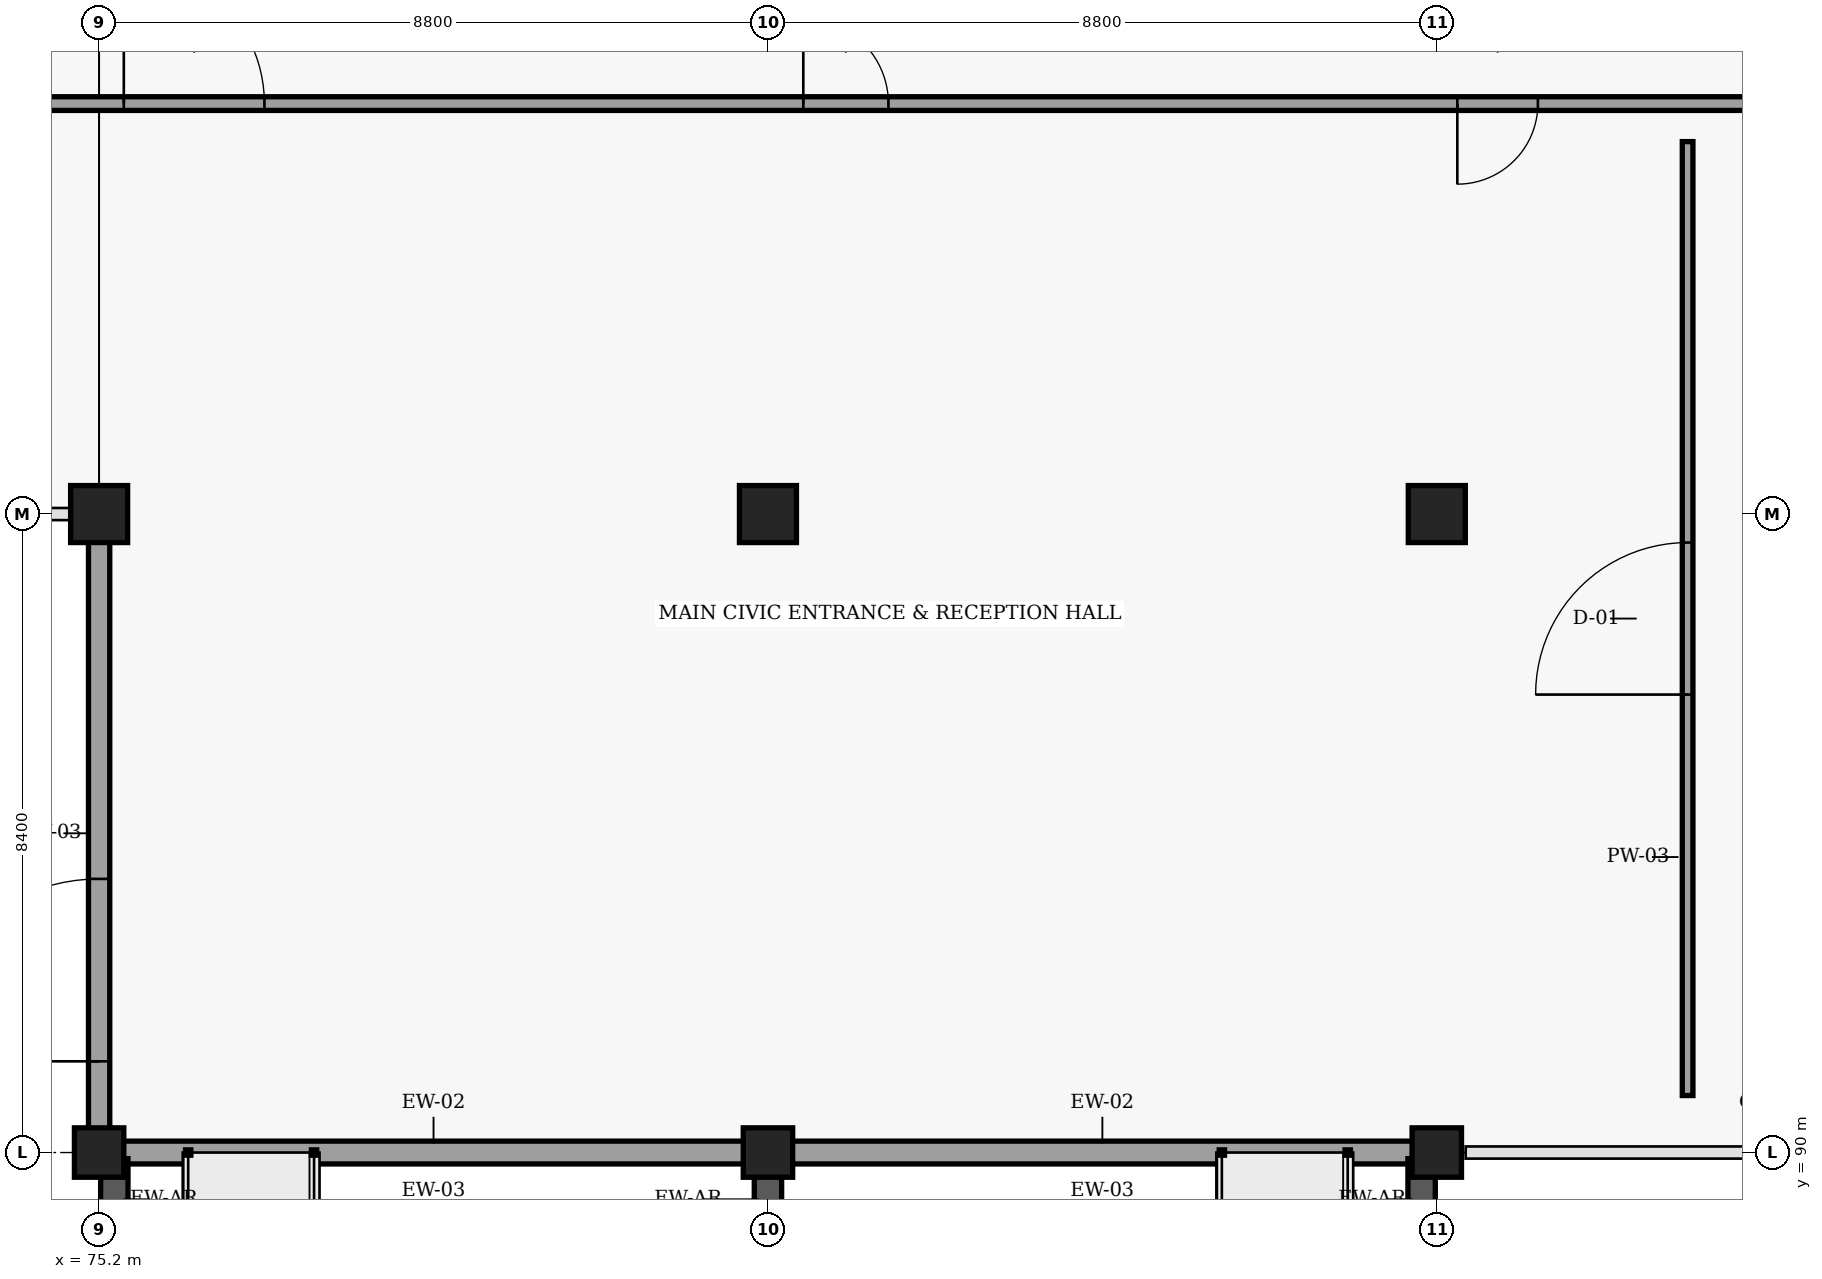
"""IFC4 building model, lengths in metres.
Left out: names, types, materials, properties, quantities, classifications, styles, units other than length and angle.
Written with IfcOpenShell. Run it as: python <this file> out.ifc"""

import sys

from ifc_helpers import new_model, si_unit, direction, frame, frame_2d, origin, origin_2d, place, context, subcontext, project, spatial, rectangle, extrude, element, fill, save


model = new_model("IFC4")
c1 = context("Model", 3, precision=1e-05, world=origin(), true_north=direction((0.0, 1.0)))
c2 = subcontext(c1, "Body", "Model", "MODEL_VIEW")
j1 = project(units=[si_unit("LENGTHUNIT", "METRE"), si_unit("PLANEANGLEUNIT", "RADIAN")], contexts=[c1])
p1 = place(None, origin())
s1 = spatial("IfcSite", under=j1, at=p1, CompositionType="ELEMENT")
p2 = place(p1, origin())
s2 = spatial("IfcBuilding", under=s1, at=p2, CompositionType="ELEMENT")
p3 = place(p2, origin())
s3 = spatial("IfcBuildingStorey", under=s2, at=p3, CompositionType="ELEMENT", Elevation=0.0)
p4 = place(p3, frame((75.2, 90.0, 0.0), z_axis=(0.0, 0.0, 1.0), x_axis=(1.0, 0.0, 0.0)))
e1 = element("IfcColumn", 1, at=p4, inside=s3, PredefinedType="COLUMN", context=c2, shape_type="SweptSolid", body=[
    extrude(rectangle(XDim=0.65, YDim=0.65, at=origin_2d()), origin(), (0.0, 0.0, 1.0), 4.8),
])
p5 = place(p3, frame((75.2, 98.4, 0.0), z_axis=(0.0, 0.0, 1.0), x_axis=(1.0, 0.0, 0.0)))
e2 = element("IfcColumn", 2, at=p5, inside=s3, PredefinedType="COLUMN", context=c2, shape_type="SweptSolid", body=[
    extrude(rectangle(XDim=0.75, YDim=0.75, at=origin_2d()), origin(), (0.0, 0.0, 1.0), 4.8),
])
p6 = place(p3, frame((84.0, 90.0, 0.0), z_axis=(0.0, 0.0, 1.0), x_axis=(1.0, 0.0, 0.0)))
e3 = element("IfcColumn", 3, at=p6, inside=s3, PredefinedType="COLUMN", context=c2, shape_type="SweptSolid", body=[
    extrude(rectangle(XDim=0.65, YDim=0.65, at=origin_2d()), origin(), (0.0, 0.0, 1.0), 4.8),
])
p7 = place(p3, frame((84.0, 98.4, 0.0), z_axis=(0.0, 0.0, 1.0), x_axis=(1.0, 0.0, 0.0)))
e4 = element("IfcColumn", 4, at=p7, inside=s3, PredefinedType="COLUMN", context=c2, shape_type="SweptSolid", body=[
    extrude(rectangle(XDim=0.75, YDim=0.75, at=origin_2d()), origin(), (0.0, 0.0, 1.0), 4.8),
])
p8 = place(p3, frame((92.8, 90.0, 0.0), z_axis=(0.0, 0.0, 1.0), x_axis=(1.0, 0.0, 0.0)))
e5 = element("IfcColumn", 5, at=p8, inside=s3, PredefinedType="COLUMN", context=c2, shape_type="SweptSolid", body=[
    extrude(rectangle(XDim=0.65, YDim=0.65, at=origin_2d()), origin(), (0.0, 0.0, 1.0), 4.8),
])
p9 = place(p3, frame((92.8, 98.4, 0.0), z_axis=(0.0, 0.0, 1.0), x_axis=(1.0, 0.0, 0.0)))
e6 = element("IfcColumn", 6, at=p9, inside=s3, PredefinedType="COLUMN", context=c2, shape_type="SweptSolid", body=[
    extrude(rectangle(XDim=0.75, YDim=0.75, at=origin_2d()), origin(), (0.0, 0.0, 1.0), 4.8),
])
for number, where, z_axis, x_axis in (
    (7, (75.3, 90.0, 0.0), (0.0, 0.0, 1.0), (1.0, 0.0, 0.0)),
    (8, (84.1, 90.0, 0.0), (0.0, 0.0, 1.0), (1.0, 0.0, 0.0)),
):
    element("IfcWall", number, at=place(p3, frame(where, z_axis=z_axis, x_axis=x_axis)), inside=s3, PredefinedType="SOLIDWALL", context=c2, shape_type="SweptSolid", body=[
        extrude(rectangle(XDim=8.6, YDim=0.3, at=frame_2d((4.3, 0.0))), origin(), (0.0, 0.0, 1.0), 3.675),
    ])
p10 = place(p3, frame((75.2, 90.15, 0.0), z_axis=(0.0, 0.0, 1.0), x_axis=(0.0, 1.0, 0.0)))
e9 = element("IfcWall", 9, at=p10, inside=s3, PredefinedType="SOLIDWALL", context=c2, shape_type="SweptSolid", body=[
    extrude(rectangle(XDim=8.1, YDim=0.28, at=frame_2d((4.05, 0.0))), origin(), (0.0, 0.0, 1.0), 3.775),
])
p11 = place(p10, frame((1.05, 0.0, 0.0)))
e10 = element("IfcOpeningElement", 10, at=p11, cuts=e9, PredefinedType="OPENING", context=c2, shape_type="SweptSolid", body=[
    extrude(rectangle(XDim=2.4, YDim=2.4, at=frame_2d((1.2, 1.2))), frame((0.0, 0.15, 0.0), z_axis=(0.0, -1.0, 0.0), x_axis=(1.0, 0.0, 0.0)), (0.0, 0.0, 1.0), 0.3),
])
for number, where, z_axis, x_axis in (
    (11, (75.4, 88.85, 0.0), (0.0, 0.0, 1.0), (0.0, 1.0, 0.0)),
    (12, (84.0, 88.85, 0.0), (0.0, 0.0, 1.0), (0.0, 1.0, 0.0)),
    (13, (92.6, 88.85, 0.0), (0.0, 0.0, 1.0), (0.0, 1.0, 0.0)),
):
    element("IfcWall", number, at=place(p3, frame(where, z_axis=z_axis, x_axis=x_axis)), inside=s3, PredefinedType="SOLIDWALL", context=c2, shape_type="SweptSolid", body=[
        extrude(rectangle(XDim=1.07, YDim=0.36, at=frame_2d((0.535, 0.0))), origin(), (0.0, 0.0, 1.0), 4.3),
    ])
p12 = place(p3, frame((42.15, 103.8, 0.0), z_axis=(0.0, 0.0, 1.0), x_axis=(1.0, 0.0, 0.0)))
e14 = element("IfcWall", 14, at=p12, inside=s3, PredefinedType="PARTITIONING", context=c2, shape_type="SweptSolid", body=[
    extrude(rectangle(XDim=102.9, YDim=0.18, at=frame_2d((51.45, 0.0))), origin(), (0.0, 0.0, 1.0), 3.775),
])
p13 = place(p12, frame((7.735, 0.0, 0.0)))
e15 = element("IfcOpeningElement", 15, at=p13, cuts=e14, PredefinedType="OPENING", context=c2, shape_type="SweptSolid", body=[
    extrude(rectangle(XDim=1.68, YDim=2.26, at=frame_2d((0.84, 1.13))), frame((0.0, 0.1, 0.0), z_axis=(0.0, -1.0, 0.0), x_axis=(1.0, 0.0, 0.0)), (0.0, 0.0, 1.0), 0.2),
])
p14 = place(p12, frame((16.63, 0.0, 0.0)))
e16 = element("IfcOpeningElement", 16, at=p14, cuts=e14, PredefinedType="OPENING", context=c2, shape_type="SweptSolid", body=[
    extrude(rectangle(XDim=1.04, YDim=2.08, at=frame_2d((0.52, 1.04))), frame((0.0, 0.1, 0.0), z_axis=(0.0, -1.0, 0.0), x_axis=(1.0, 0.0, 0.0)), (0.0, 0.0, 1.0), 0.2),
])
p15 = place(p12, frame((24.725, 0.0, 0.0)))
e17 = element("IfcOpeningElement", 17, at=p15, cuts=e14, PredefinedType="OPENING", context=c2, shape_type="SweptSolid", body=[
    extrude(rectangle(XDim=2.0, YDim=2.3, at=frame_2d((1.0, 1.15))), frame((0.0, 0.1, 0.0), z_axis=(0.0, -1.0, 0.0), x_axis=(1.0, 0.0, 0.0)), (0.0, 0.0, 1.0), 0.2),
])
p16 = place(p12, frame((33.375, 0.0, 0.0)))
e18 = element("IfcOpeningElement", 18, at=p16, cuts=e14, PredefinedType="OPENING", context=c2, shape_type="SweptSolid", body=[
    extrude(rectangle(XDim=1.85, YDim=2.22, at=frame_2d((0.925, 1.11))), frame((0.0, 0.1, 0.0), z_axis=(0.0, -1.0, 0.0), x_axis=(1.0, 0.0, 0.0)), (0.0, 0.0, 1.0), 0.2),
])
p17 = place(p12, frame((42.315, 0.0, 0.0)))
e19 = element("IfcOpeningElement", 19, at=p17, cuts=e14, PredefinedType="OPENING", context=c2, shape_type="SweptSolid", body=[
    extrude(rectangle(XDim=1.12, YDim=2.16, at=frame_2d((0.56, 1.08))), frame((0.0, 0.1, 0.0), z_axis=(0.0, -1.0, 0.0), x_axis=(1.0, 0.0, 0.0)), (0.0, 0.0, 1.0), 0.2),
])
p18 = place(p12, frame((50.92, 0.0, 0.0)))
e20 = element("IfcOpeningElement", 20, at=p18, cuts=e14, PredefinedType="OPENING", context=c2, shape_type="SweptSolid", body=[
    extrude(rectangle(XDim=1.06, YDim=2.16, at=frame_2d((0.53, 1.08))), frame((0.0, 0.1, 0.0), z_axis=(0.0, -1.0, 0.0), x_axis=(1.0, 0.0, 0.0)), (0.0, 0.0, 1.0), 0.2),
])
p19 = place(p12, frame((59.525, 0.0, 0.0)))
e21 = element("IfcOpeningElement", 21, at=p19, cuts=e14, PredefinedType="OPENING", context=c2, shape_type="SweptSolid", body=[
    extrude(rectangle(XDim=1.0, YDim=2.14, at=frame_2d((0.5, 1.07))), frame((0.0, 0.1, 0.0), z_axis=(0.0, -1.0, 0.0), x_axis=(1.0, 0.0, 0.0)), (0.0, 0.0, 1.0), 0.2),
])
p20 = place(p12, frame((68.11, 0.0, 0.0)))
e22 = element("IfcOpeningElement", 22, at=p20, cuts=e14, PredefinedType="OPENING", context=c2, shape_type="SweptSolid", body=[
    extrude(rectangle(XDim=0.98, YDim=2.12, at=frame_2d((0.49, 1.06))), frame((0.0, 0.1, 0.0), z_axis=(0.0, -1.0, 0.0), x_axis=(1.0, 0.0, 0.0)), (0.0, 0.0, 1.0), 0.2),
])
p21 = place(p12, frame((76.7, 0.0, 0.0)))
e23 = element("IfcOpeningElement", 23, at=p21, cuts=e14, PredefinedType="OPENING", context=c2, shape_type="SweptSolid", body=[
    extrude(rectangle(XDim=0.95, YDim=2.12, at=frame_2d((0.475, 1.06))), frame((0.0, 0.1, 0.0), z_axis=(0.0, -1.0, 0.0), x_axis=(1.0, 0.0, 0.0)), (0.0, 0.0, 1.0), 0.2),
])
p22 = place(p12, frame((85.29, 0.0, 0.0)))
e24 = element("IfcOpeningElement", 24, at=p22, cuts=e14, PredefinedType="OPENING", context=c2, shape_type="SweptSolid", body=[
    extrude(rectangle(XDim=0.92, YDim=2.1, at=frame_2d((0.46, 1.05))), frame((0.0, 0.1, 0.0), z_axis=(0.0, -1.0, 0.0), x_axis=(1.0, 0.0, 0.0)), (0.0, 0.0, 1.0), 0.2),
])
p23 = place(p12, frame((93.845, 0.0, 0.0)))
e25 = element("IfcOpeningElement", 25, at=p23, cuts=e14, PredefinedType="OPENING", context=c2, shape_type="SweptSolid", body=[
    extrude(rectangle(XDim=0.96, YDim=2.08, at=frame_2d((0.48, 1.04))), frame((0.0, 0.1, 0.0), z_axis=(0.0, -1.0, 0.0), x_axis=(1.0, 0.0, 0.0)), (0.0, 0.0, 1.0), 0.2),
])
p24 = place(p3, frame((96.1, 90.75, 0.0), z_axis=(0.0, 0.0, 1.0), x_axis=(0.0, 1.0, 0.0)))
e26 = element("IfcWall", 26, at=p24, inside=s3, PredefinedType="PARTITIONING", context=c2, shape_type="SweptSolid", body=[
    extrude(rectangle(XDim=12.55, YDim=0.14, at=frame_2d((6.275, 0.0))), origin(), (0.0, 0.0, 1.0), 3.675),
])
p25 = place(p24, frame((5.275, 0.0, 0.0)))
e27 = element("IfcOpeningElement", 27, at=p25, cuts=e26, PredefinedType="OPENING", context=c2, shape_type="SweptSolid", body=[
    extrude(rectangle(XDim=2.0, YDim=2.3, at=frame_2d((1.0, 1.15))), frame((0.0, 0.08, 0.0), z_axis=(0.0, -1.0, 0.0), x_axis=(1.0, 0.0, 0.0)), (0.0, 0.0, 1.0), 0.16),
])
p26 = place(p11, origin())
e28 = element("IfcDoor", 28, at=p26, inside=s3, OperationType="DOUBLE_DOOR_SINGLE_SWING", PredefinedType="DOOR", context=c2, shape_type="SweptSolid", body=[
    extrude(rectangle(XDim=2.4, YDim=2.4, at=frame_2d((1.2, 1.2))), frame((0.0, 0.025, 0.0), z_axis=(0.0, -1.0, 0.0), x_axis=(1.0, 0.0, 0.0)), (0.0, 0.0, 1.0), 0.05),
])
fill(e10, e28)
p27 = place(p16, origin())
e29 = element("IfcDoor", 29, at=p27, inside=s3, OperationType="DOUBLE_DOOR_SINGLE_SWING", PredefinedType="DOOR", context=c2, shape_type="SweptSolid", body=[
    extrude(rectangle(XDim=1.85, YDim=2.22, at=frame_2d((0.925, 1.11))), frame((0.0, 0.025, 0.0), z_axis=(0.0, -1.0, 0.0), x_axis=(1.0, 0.0, 0.0)), (0.0, 0.0, 1.0), 0.05),
])
fill(e18, e29)
p28 = place(p17, origin())
e30 = element("IfcDoor", 30, at=p28, inside=s3, OperationType="SINGLE_SWING_LEFT", PredefinedType="DOOR", context=c2, shape_type="SweptSolid", body=[
    extrude(rectangle(XDim=1.12, YDim=2.16, at=frame_2d((0.56, 1.08))), frame((0.0, 0.025, 0.0), z_axis=(0.0, -1.0, 0.0), x_axis=(1.0, 0.0, 0.0)), (0.0, 0.0, 1.0), 0.05),
])
fill(e19, e30)
p29 = place(p18, origin())
e31 = element("IfcDoor", 31, at=p29, inside=s3, OperationType="SINGLE_SWING_RIGHT", PredefinedType="DOOR", context=c2, shape_type="SweptSolid", body=[
    extrude(rectangle(XDim=1.06, YDim=2.16, at=frame_2d((0.53, 1.08))), frame((0.0, 0.025, 0.0), z_axis=(0.0, -1.0, 0.0), x_axis=(1.0, 0.0, 0.0)), (0.0, 0.0, 1.0), 0.05),
])
fill(e20, e31)
p30 = place(p25, origin())
e32 = element("IfcDoor", 32, at=p30, inside=s3, OperationType="DOUBLE_DOOR_SINGLE_SWING", PredefinedType="DOOR", context=c2, shape_type="SweptSolid", body=[
    extrude(rectangle(XDim=2.0, YDim=2.3, at=frame_2d((1.0, 1.15))), frame((0.0, 0.025, 0.0), z_axis=(0.0, -1.0, 0.0), x_axis=(1.0, 0.0, 0.0)), (0.0, 0.0, 1.0), 0.05),
])
fill(e27, e32)
save(model, sys.argv[1])
